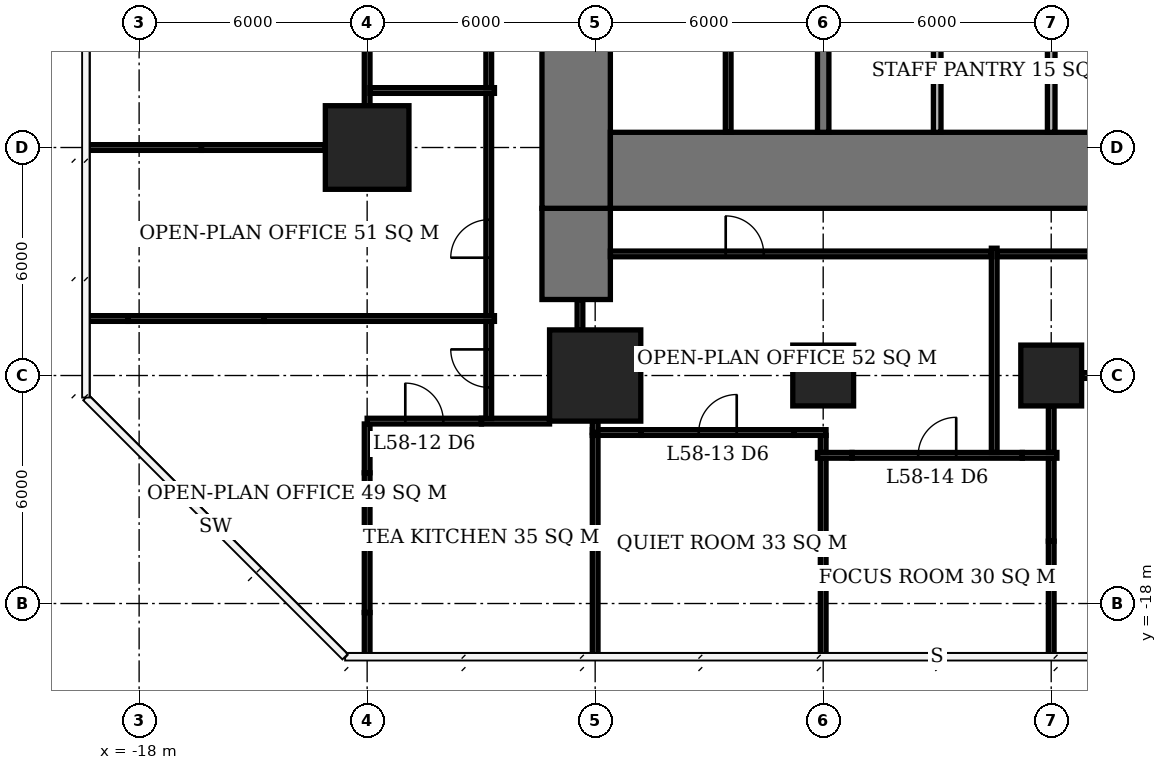
"""IFC4 building model, lengths in metres.
Left out: names, types, materials, properties, quantities, classifications, styles, units other than length and angle.
Written with IfcOpenShell. Run it as: python <this file> out.ifc"""

import sys

from ifc_helpers import new_model, si_unit, direction, frame, frame_2d, origin, origin_2d, place, context, subcontext, project, spatial, rectangle, extrude, element, fill, save


model = new_model("IFC4")
c1 = context("Model", 3, precision=1e-05, world=origin(), true_north=direction((0.0, 1.0)))
c2 = subcontext(c1, "Body", "Model", "MODEL_VIEW")
j1 = project(units=[si_unit("LENGTHUNIT", "METRE"), si_unit("PLANEANGLEUNIT", "RADIAN")], contexts=[c1])
p1 = place(None, origin())
s1 = spatial("IfcSite", under=j1, at=p1, CompositionType="ELEMENT")
p2 = place(p1, origin())
s2 = spatial("IfcBuilding", under=s1, at=p2, CompositionType="ELEMENT")
p3 = place(p2, frame((0.0, 0.0, 235.7)))
s3 = spatial("IfcBuildingStorey", under=s2, at=p3, CompositionType="ELEMENT", Elevation=235.7)
p4 = place(p3, frame((-12.0, -6.0, 0.0), z_axis=(0.0, 0.0, 1.0), x_axis=(1.0, 0.0, 0.0)))
e1 = element("IfcColumn", 1, at=p4, inside=s3, PredefinedType="COLUMN", context=c2, shape_type="SweptSolid", body=[
    extrude(rectangle(XDim=2.2, YDim=2.2, at=origin_2d()), origin(), (0.0, 0.0, 1.0), 3.9),
])
p5 = place(p3, frame((-6.0, -12.0, 0.0), z_axis=(0.0, 0.0, 1.0), x_axis=(1.0, 0.0, 0.0)))
e2 = element("IfcColumn", 2, at=p5, inside=s3, PredefinedType="COLUMN", context=c2, shape_type="SweptSolid", body=[
    extrude(rectangle(XDim=2.4, YDim=2.4, at=origin_2d()), origin(), (0.0, 0.0, 1.0), 3.9),
])
for number, where, z_axis, x_axis in (
    (3, (0.0, -12.0, 0.0), (0.0, 0.0, 1.0), (1.0, 0.0, 0.0)),
    (4, (6.0, -12.0, 0.0), (0.0, 0.0, 1.0), (1.0, 0.0, 0.0)),
):
    element("IfcColumn", number, at=place(p3, frame(where, z_axis=z_axis, x_axis=x_axis)), inside=s3, PredefinedType="COLUMN", context=c2, shape_type="SweptSolid", body=[
        extrude(rectangle(XDim=1.6, YDim=1.6, at=origin_2d()), origin(), (0.0, 0.0, 1.0), 3.9),
    ])
p6 = place(p3, frame((-5.6, -6.6, 0.0), z_axis=(0.0, 0.0, 1.0), x_axis=(1.0, 0.0, 0.0)))
e5 = element("IfcWall", 5, at=p6, inside=s3, PredefinedType="SHEAR", context=c2, shape_type="SweptSolid", body=[
    extrude(rectangle(XDim=23.2, YDim=2.0, at=frame_2d((11.6, 0.0))), origin(), (0.0, 0.0, 1.0), 3.9),
])
p7 = place(p3, frame((-6.5, -7.6, 0.0), z_axis=(0.0, 0.0, 1.0), x_axis=(0.0, 1.0, 0.0)))
e6 = element("IfcWall", 6, at=p7, inside=s3, PredefinedType="SHEAR", context=c2, shape_type="SweptSolid", body=[
    extrude(rectangle(XDim=21.2, YDim=1.8, at=frame_2d((10.6, 0.0))), origin(), (0.0, 0.0, 1.0), 3.9),
])
p8 = place(p7, frame((7.8, 0.0, 0.0)))
e7 = element("IfcOpeningElement", 7, at=p8, cuts=e6, PredefinedType="OPENING", context=c2, shape_type="SweptSolid", body=[
    extrude(rectangle(XDim=1.8, YDim=2.4, at=frame_2d((0.9, 1.2))), frame((0.0, 0.91, 0.0), z_axis=(0.0, -1.0, 0.0), x_axis=(1.0, 0.0, 0.0)), (0.0, 0.0, 1.0), 1.82),
])
p9 = place(p3, frame((-6.5, -10.0, 0.0), z_axis=(0.0, 0.0, 1.0), x_axis=(0.0, 1.0, 0.0)))
e8 = element("IfcWall", 8, at=p9, inside=s3, PredefinedType="SHEAR", context=c2, shape_type="SweptSolid", body=[
    extrude(rectangle(XDim=2.4, YDim=1.8, at=frame_2d((1.2, 0.0))), origin(), (0.0, 0.0, 1.0), 3.9),
])
p10 = place(p3, frame((0.0, -5.6, 0.0), z_axis=(0.0, 0.0, 1.0), x_axis=(0.0, 1.0, 0.0)))
e9 = element("IfcWall", 9, at=p10, inside=s3, PredefinedType="SHEAR", context=c2, shape_type="SweptSolid", body=[
    extrude(rectangle(XDim=5.45, YDim=0.3, at=frame_2d((2.725, 0.0))), origin(), (0.0, 0.0, 1.0), 3.9),
])
for number, where, z_axis, x_axis in (
    (10, (3.0, -5.6, 0.0), (0.0, 0.0, 1.0), (0.0, 1.0, 0.0)),
    (11, (6.0, -5.6, 0.0), (0.0, 0.0, 1.0), (0.0, 1.0, 0.0)),
):
    element("IfcWall", number, at=place(p3, frame(where, z_axis=z_axis, x_axis=x_axis)), inside=s3, PredefinedType="SOLIDWALL", context=c2, shape_type="SweptSolid", body=[
        extrude(rectangle(XDim=5.45, YDim=0.2, at=frame_2d((2.725, 0.0))), origin(), (0.0, 0.0, 1.0), 3.9),
    ])
p11 = place(p3, frame((-2.5, -5.6, 0.0), z_axis=(0.0, 0.0, 1.0), x_axis=(0.0, 1.0, 0.0)))
e12 = element("IfcWall", 12, at=p11, inside=s3, PredefinedType="PLUMBINGWALL", context=c2, shape_type="SweptSolid", body=[
    extrude(rectangle(XDim=5.45, YDim=0.15, at=frame_2d((2.725, 0.0))), origin(), (0.0, 0.0, 1.0), 3.65),
])
p12 = place(p3, frame((-0.15, -14.1, 0.0), z_axis=(0.0, 0.0, 1.0), x_axis=(1.0, 0.0, 0.0)))
e13 = element("IfcWall", 13, at=p12, inside=s3, PredefinedType="PARTITIONING", context=c2, shape_type="SweptSolid", body=[
    extrude(rectangle(XDim=0.91, YDim=0.15, at=frame_2d((0.455, 0.0))), origin(), (0.0, 0.0, 1.0), 2.15),
])
p13 = place(p3, frame((0.76, -14.1, 0.0), z_axis=(0.0, 0.0, 1.0), x_axis=(1.0, 0.0, 0.0)))
e14 = element("IfcWall", 14, at=p13, inside=s3, PredefinedType="PARTITIONING", context=c2, shape_type="SweptSolid", body=[
    extrude(rectangle(XDim=4.48, YDim=0.15, at=frame_2d((2.24, 0.0))), origin(), (0.0, 0.0, 1.0), 3.65),
])
p14 = place(p13, frame((1.74, 0.0, 0.0)))
e15 = element("IfcOpeningElement", 15, at=p14, cuts=e14, PredefinedType="OPENING", context=c2, shape_type="SweptSolid", body=[
    extrude(rectangle(XDim=1.0, YDim=2.1, at=frame_2d((0.5, 1.05))), frame((0.0, 0.085, 0.0), z_axis=(0.0, -1.0, 0.0), x_axis=(1.0, 0.0, 0.0)), (0.0, 0.0, 1.0), 0.17),
])
p15 = place(p3, frame((5.24, -14.1, 0.0), z_axis=(0.0, 0.0, 1.0), x_axis=(1.0, 0.0, 0.0)))
e16 = element("IfcWall", 16, at=p15, inside=s3, PredefinedType="PARTITIONING", context=c2, shape_type="SweptSolid", body=[
    extrude(rectangle(XDim=0.91, YDim=0.15, at=frame_2d((0.455, 0.0))), origin(), (0.0, 0.0, 1.0), 2.15),
])
p16 = place(p3, frame((-6.075, -13.5, 0.0), z_axis=(0.0, 0.0, 1.0), x_axis=(1.0, 0.0, 0.0)))
e17 = element("IfcWall", 17, at=p16, inside=s3, PredefinedType="PARTITIONING", context=c2, shape_type="SweptSolid", body=[
    extrude(rectangle(XDim=1.285, YDim=0.15, at=frame_2d((0.643, 0.0))), origin(), (0.0, 0.0, 1.0), 2.15),
])
p17 = place(p3, frame((-4.79, -13.5, 0.0), z_axis=(0.0, 0.0, 1.0), x_axis=(1.0, 0.0, 0.0)))
e18 = element("IfcWall", 18, at=p17, inside=s3, PredefinedType="PARTITIONING", context=c2, shape_type="SweptSolid", body=[
    extrude(rectangle(XDim=4.03, YDim=0.15, at=frame_2d((2.015, 0.0))), origin(), (0.0, 0.0, 1.0), 3.65),
])
p18 = place(p17, frame((1.515, 0.0, 0.0)))
e19 = element("IfcOpeningElement", 19, at=p18, cuts=e18, PredefinedType="OPENING", context=c2, shape_type="SweptSolid", body=[
    extrude(rectangle(XDim=1.0, YDim=2.1, at=frame_2d((0.5, 1.05))), frame((0.0, 0.085, 0.0), z_axis=(0.0, -1.0, 0.0), x_axis=(1.0, 0.0, 0.0)), (0.0, 0.0, 1.0), 0.17),
])
p19 = place(p3, frame((-0.76, -13.5, 0.0), z_axis=(0.0, 0.0, 1.0), x_axis=(1.0, 0.0, 0.0)))
e20 = element("IfcWall", 20, at=p19, inside=s3, PredefinedType="PARTITIONING", context=c2, shape_type="SweptSolid", body=[
    extrude(rectangle(XDim=0.835, YDim=0.15, at=frame_2d((0.417, 0.0))), origin(), (0.0, 0.0, 1.0), 2.15),
])
p20 = place(p3, frame((-12.0, -13.2, 0.0), z_axis=(0.0, 0.0, 1.0), x_axis=(1.0, 0.0, 0.0)))
e21 = element("IfcWall", 21, at=p20, inside=s3, PredefinedType="PARTITIONING", context=c2, shape_type="SweptSolid", body=[
    extrude(rectangle(XDim=3.008, YDim=0.15, at=frame_2d((1.504, 0.0))), origin(), (0.0, 0.0, 1.0), 3.65),
])
p21 = place(p20, frame((1.004, 0.0, 0.0)))
e22 = element("IfcOpeningElement", 22, at=p21, cuts=e21, PredefinedType="OPENING", context=c2, shape_type="SweptSolid", body=[
    extrude(rectangle(XDim=1.0, YDim=2.1, at=frame_2d((0.5, 1.05))), frame((0.0, 0.085, 0.0), z_axis=(0.0, -1.0, 0.0), x_axis=(1.0, 0.0, 0.0)), (0.0, 0.0, 1.0), 0.17),
])
p22 = place(p3, frame((-8.992, -13.2, 0.0), z_axis=(0.0, 0.0, 1.0), x_axis=(1.0, 0.0, 0.0)))
e23 = element("IfcWall", 23, at=p22, inside=s3, PredefinedType="PARTITIONING", context=c2, shape_type="SweptSolid", body=[
    extrude(rectangle(XDim=1.792, YDim=0.15, at=frame_2d((0.896, 0.0))), origin(), (0.0, 0.0, 1.0), 2.15),
])
p23 = place(p3, frame((6.8, -12.0, 0.0), z_axis=(0.0, 0.0, 1.0), x_axis=(1.0, 0.0, 0.0)))
e24 = element("IfcWall", 24, at=p23, inside=s3, PredefinedType="PARTITIONING", context=c2, shape_type="SweptSolid", body=[
    extrude(rectangle(XDim=4.4, YDim=0.15, at=frame_2d((2.2, 0.0))), origin(), (0.0, 0.0, 1.0), 3.65),
])
p24 = place(p23, frame((1.7, 0.0, 0.0)))
e25 = element("IfcOpeningElement", 25, at=p24, cuts=e24, PredefinedType="OPENING", context=c2, shape_type="SweptSolid", body=[
    extrude(rectangle(XDim=1.0, YDim=2.1, at=frame_2d((0.5, 1.05))), frame((0.0, 0.085, 0.0), z_axis=(0.0, -1.0, 0.0), x_axis=(1.0, 0.0, 0.0)), (0.0, 0.0, 1.0), 0.17),
])
p25 = place(p3, frame((-19.4, -6.0, 0.0), z_axis=(0.0, 0.0, 1.0), x_axis=(1.0, 0.0, 0.0)))
e26 = element("IfcWall", 26, at=p25, inside=s3, PredefinedType="PARTITIONING", context=c2, shape_type="SweptSolid", body=[
    extrude(rectangle(XDim=3.04, YDim=0.15, at=frame_2d((1.52, 0.0))), origin(), (0.0, 0.0, 1.0), 3.65),
])
p26 = place(p3, frame((-16.36, -6.0, 0.0), z_axis=(0.0, 0.0, 1.0), x_axis=(1.0, 0.0, 0.0)))
e27 = element("IfcWall", 27, at=p26, inside=s3, PredefinedType="PARTITIONING", context=c2, shape_type="SweptSolid", body=[
    extrude(rectangle(XDim=3.26, YDim=0.15, at=frame_2d((1.63, 0.0))), origin(), (0.0, 0.0, 1.0), 2.15),
])
p27 = place(p3, frame((-12.0, -19.4, 0.0), z_axis=(0.0, 0.0, 1.0), x_axis=(0.0, 1.0, 0.0)))
e28 = element("IfcWall", 28, at=p27, inside=s3, PredefinedType="PARTITIONING", context=c2, shape_type="SweptSolid", body=[
    extrude(rectangle(XDim=1.163, YDim=0.15, at=frame_2d((0.582, 0.0))), origin(), (0.0, 0.0, 1.0), 3.65),
])
p28 = place(p3, frame((-12.0, -18.237, 0.0), z_axis=(0.0, 0.0, 1.0), x_axis=(0.0, 1.0, 0.0)))
e29 = element("IfcWall", 29, at=p28, inside=s3, PredefinedType="PARTITIONING", context=c2, shape_type="SweptSolid", body=[
    extrude(rectangle(XDim=2.029, YDim=0.15, at=frame_2d((1.015, 0.0))), origin(), (0.0, 0.0, 1.0), 2.15),
])
p29 = place(p3, frame((-12.0, -16.208, 0.0), z_axis=(0.0, 0.0, 1.0), x_axis=(0.0, 1.0, 0.0)))
e30 = element("IfcWall", 30, at=p29, inside=s3, PredefinedType="PARTITIONING", context=c2, shape_type="SweptSolid", body=[
    extrude(rectangle(XDim=1.647, YDim=0.15, at=frame_2d((0.824, 0.0))), origin(), (0.0, 0.0, 1.0), 3.65),
])
p30 = place(p3, frame((-12.0, -14.561, 0.0), z_axis=(0.0, 0.0, 1.0), x_axis=(0.0, 1.0, 0.0)))
e31 = element("IfcWall", 31, at=p30, inside=s3, PredefinedType="PARTITIONING", context=c2, shape_type="SweptSolid", body=[
    extrude(rectangle(XDim=1.286, YDim=0.15, at=frame_2d((0.643, 0.0))), origin(), (0.0, 0.0, 1.0), 2.15),
])
p31 = place(p3, frame((-12.0, -4.915, 0.0), z_axis=(0.0, 0.0, 1.0), x_axis=(0.0, 1.0, 0.0)))
e32 = element("IfcWall", 32, at=p31, inside=s3, PredefinedType="PARTITIONING", context=c2, shape_type="SweptSolid", body=[
    extrude(rectangle(XDim=4.115, YDim=0.15, at=frame_2d((2.058, 0.0))), origin(), (0.0, 0.0, 1.0), 3.65),
])
p32 = place(p3, frame((-6.0, -19.4, 0.0), z_axis=(0.0, 0.0, 1.0), x_axis=(0.0, 1.0, 0.0)))
e33 = element("IfcWall", 33, at=p32, inside=s3, PredefinedType="PARTITIONING", context=c2, shape_type="SweptSolid", body=[
    extrude(rectangle(XDim=3.04, YDim=0.15, at=frame_2d((1.52, 0.0))), origin(), (0.0, 0.0, 1.0), 3.65),
])
p33 = place(p3, frame((-6.0, -16.36, 0.0), z_axis=(0.0, 0.0, 1.0), x_axis=(0.0, 1.0, 0.0)))
e34 = element("IfcWall", 34, at=p33, inside=s3, PredefinedType="PARTITIONING", context=c2, shape_type="SweptSolid", body=[
    extrude(rectangle(XDim=2.785, YDim=0.15, at=frame_2d((1.393, 0.0))), origin(), (0.0, 0.0, 1.0), 2.15),
])
p34 = place(p3, frame((-6.0, -13.5, 0.0), z_axis=(0.0, 0.0, 1.0), x_axis=(0.0, 1.0, 0.0)))
e35 = element("IfcWall", 35, at=p34, inside=s3, PredefinedType="PARTITIONING", context=c2, shape_type="SweptSolid", body=[
    extrude(rectangle(XDim=0.3, YDim=0.15, at=frame_2d((0.15, 0.0))), origin(), (0.0, 0.0, 1.0), 2.15),
])
p35 = place(p3, frame((0.0, -19.35, 0.0), z_axis=(0.0, 0.0, 1.0), x_axis=(0.0, 1.0, 0.0)))
e36 = element("IfcWall", 36, at=p35, inside=s3, PredefinedType="PARTITIONING", context=c2, shape_type="SweptSolid", body=[
    extrude(rectangle(XDim=2.99, YDim=0.15, at=frame_2d((1.495, 0.0))), origin(), (0.0, 0.0, 1.0), 3.65),
])
p36 = place(p3, frame((0.0, -16.36, 0.0), z_axis=(0.0, 0.0, 1.0), x_axis=(0.0, 1.0, 0.0)))
e37 = element("IfcWall", 37, at=p36, inside=s3, PredefinedType="PARTITIONING", context=c2, shape_type="SweptSolid", body=[
    extrude(rectangle(XDim=2.185, YDim=0.15, at=frame_2d((1.093, 0.0))), origin(), (0.0, 0.0, 1.0), 2.15),
])
p37 = place(p3, frame((0.0, -14.025, 0.0), z_axis=(0.0, 0.0, 1.0), x_axis=(0.0, 1.0, 0.0)))
e38 = element("IfcWall", 38, at=p37, inside=s3, PredefinedType="PARTITIONING", context=c2, shape_type="SweptSolid", body=[
    extrude(rectangle(XDim=0.45, YDim=0.15, at=frame_2d((0.225, 0.0))), origin(), (0.0, 0.0, 1.0), 2.15),
])
p38 = place(p3, frame((6.0, -19.35, 0.0), z_axis=(0.0, 0.0, 1.0), x_axis=(0.0, 1.0, 0.0)))
e39 = element("IfcWall", 39, at=p38, inside=s3, PredefinedType="PARTITIONING", context=c2, shape_type="SweptSolid", body=[
    extrude(rectangle(XDim=2.99, YDim=0.15, at=frame_2d((1.495, 0.0))), origin(), (0.0, 0.0, 1.0), 3.65),
])
p39 = place(p3, frame((6.0, -16.36, 0.0), z_axis=(0.0, 0.0, 1.0), x_axis=(0.0, 1.0, 0.0)))
e40 = element("IfcWall", 40, at=p39, inside=s3, PredefinedType="PARTITIONING", context=c2, shape_type="SweptSolid", body=[
    extrude(rectangle(XDim=2.185, YDim=0.15, at=frame_2d((1.093, 0.0))), origin(), (0.0, 0.0, 1.0), 2.15),
])
p40 = place(p3, frame((6.0, -14.025, 0.0), z_axis=(0.0, 0.0, 1.0), x_axis=(0.0, 1.0, 0.0)))
e41 = element("IfcWall", 41, at=p40, inside=s3, PredefinedType="PARTITIONING", context=c2, shape_type="SweptSolid", body=[
    extrude(rectangle(XDim=1.225, YDim=0.15, at=frame_2d((0.612, 0.0))), origin(), (0.0, 0.0, 1.0), 2.15),
])
p41 = place(p3, frame((-19.4, -10.5, 0.0), z_axis=(0.0, 0.0, 1.0), x_axis=(1.0, 0.0, 0.0)))
e42 = element("IfcWall", 42, at=p41, inside=s3, PredefinedType="PARTITIONING", context=c2, shape_type="SweptSolid", body=[
    extrude(rectangle(XDim=1.108, YDim=0.15, at=frame_2d((0.554, 0.0))), origin(), (0.0, 0.0, 1.0), 3.65),
])
p42 = place(p3, frame((-18.292, -10.5, 0.0), z_axis=(0.0, 0.0, 1.0), x_axis=(1.0, 0.0, 0.0)))
e43 = element("IfcWall", 43, at=p42, inside=s3, PredefinedType="PARTITIONING", context=c2, shape_type="SweptSolid", body=[
    extrude(rectangle(XDim=3.584, YDim=0.15, at=frame_2d((1.792, 0.0))), origin(), (0.0, 0.0, 1.0), 2.15),
])
p43 = place(p3, frame((-14.708, -10.5, 0.0), z_axis=(0.0, 0.0, 1.0), x_axis=(1.0, 0.0, 0.0)))
e44 = element("IfcWall", 44, at=p43, inside=s3, PredefinedType="PARTITIONING", context=c2, shape_type="SweptSolid", body=[
    extrude(rectangle(XDim=6.058, YDim=0.15, at=frame_2d((3.029, 0.0))), origin(), (0.0, 0.0, 1.0), 3.65),
])
p44 = place(p3, frame((-11.925, -4.5, 0.0), z_axis=(0.0, 0.0, 1.0), x_axis=(1.0, 0.0, 0.0)))
e45 = element("IfcWall", 45, at=p44, inside=s3, PredefinedType="PARTITIONING", context=c2, shape_type="SweptSolid", body=[
    extrude(rectangle(XDim=3.275, YDim=0.15, at=frame_2d((1.638, 0.0))), origin(), (0.0, 0.0, 1.0), 3.65),
])
p45 = place(p3, frame((-8.8, -13.133, 0.0), z_axis=(0.0, 0.0, 1.0), x_axis=(0.0, 1.0, 0.0)))
e46 = element("IfcWall", 46, at=p45, inside=s3, PredefinedType="PARTITIONING", context=c2, shape_type="SweptSolid", body=[
    extrude(rectangle(XDim=2.558, YDim=0.15, at=frame_2d((1.279, 0.0))), origin(), (0.0, 0.0, 1.0), 3.65),
])
p46 = place(p45, frame((0.82, 0.0, 0.0)))
e47 = element("IfcOpeningElement", 47, at=p46, cuts=e46, PredefinedType="OPENING", context=c2, shape_type="SweptSolid", body=[
    extrude(rectangle(XDim=1.0, YDim=2.1, at=frame_2d((0.5, 1.05))), frame((0.0, 0.085, 0.0), z_axis=(0.0, -1.0, 0.0), x_axis=(1.0, 0.0, 0.0)), (0.0, 0.0, 1.0), 0.17),
])
p47 = place(p3, frame((-8.8, -10.425, 0.0), z_axis=(0.0, 0.0, 1.0), x_axis=(0.0, 1.0, 0.0)))
e48 = element("IfcWall", 48, at=p47, inside=s3, PredefinedType="PARTITIONING", context=c2, shape_type="SweptSolid", body=[
    extrude(rectangle(XDim=5.85, YDim=0.15, at=frame_2d((2.925, 0.0))), origin(), (0.0, 0.0, 1.0), 3.65),
])
p48 = place(p47, frame((1.525, 0.0, 0.0)))
e49 = element("IfcOpeningElement", 49, at=p48, cuts=e48, PredefinedType="OPENING", context=c2, shape_type="SweptSolid", body=[
    extrude(rectangle(XDim=1.0, YDim=2.1, at=frame_2d((0.5, 1.05))), frame((0.0, 0.085, 0.0), z_axis=(0.0, -1.0, 0.0), x_axis=(1.0, 0.0, 0.0)), (0.0, 0.0, 1.0), 0.17),
])
p49 = place(p3, frame((-8.8, -4.425, 0.0), z_axis=(0.0, 0.0, 1.0), x_axis=(0.0, 1.0, 0.0)))
e50 = element("IfcWall", 50, at=p49, inside=s3, PredefinedType="PARTITIONING", context=c2, shape_type="SweptSolid", body=[
    extrude(rectangle(XDim=29.825, YDim=0.15, at=frame_2d((14.913, 0.0))), origin(), (0.0, 0.0, 1.0), 3.65),
])
p50 = place(p49, frame((9.855, 0.0, 0.0)))
e51 = element("IfcOpeningElement", 51, at=p50, cuts=e50, PredefinedType="OPENING", context=c2, shape_type="SweptSolid", body=[
    extrude(rectangle(XDim=1.0, YDim=2.1, at=frame_2d((0.5, 1.05))), frame((0.0, 0.085, 0.0), z_axis=(0.0, -1.0, 0.0), x_axis=(1.0, 0.0, 0.0)), (0.0, 0.0, 1.0), 0.17),
])
p51 = place(p3, frame((-6.4, -10.8, 0.0), z_axis=(0.0, 0.0, 1.0), x_axis=(0.0, 1.0, 0.0)))
e52 = element("IfcWall", 52, at=p51, inside=s3, PredefinedType="PARTITIONING", context=c2, shape_type="SweptSolid", body=[
    extrude(rectangle(XDim=0.8, YDim=0.15, at=frame_2d((0.4, 0.0))), origin(), (0.0, 0.0, 1.0), 3.65),
])
p52 = place(p3, frame((-5.6, -8.8, 0.0), z_axis=(0.0, 0.0, 1.0), x_axis=(1.0, 0.0, 0.0)))
e53 = element("IfcWall", 53, at=p52, inside=s3, PredefinedType="PARTITIONING", context=c2, shape_type="SweptSolid", body=[
    extrude(rectangle(XDim=10.025, YDim=0.15, at=frame_2d((5.013, 0.0))), origin(), (0.0, 0.0, 1.0), 3.65),
])
p53 = place(p52, frame((3.035, 0.0, 0.0)))
e54 = element("IfcOpeningElement", 54, at=p53, cuts=e53, PredefinedType="OPENING", context=c2, shape_type="SweptSolid", body=[
    extrude(rectangle(XDim=1.0, YDim=2.1, at=frame_2d((0.5, 1.05))), frame((0.0, 0.085, 0.0), z_axis=(0.0, -1.0, 0.0), x_axis=(1.0, 0.0, 0.0)), (0.0, 0.0, 1.0), 0.17),
])
p54 = place(p3, frame((4.5, -14.025, 0.0), z_axis=(0.0, 0.0, 1.0), x_axis=(0.0, 1.0, 0.0)))
e55 = element("IfcWall", 55, at=p54, inside=s3, PredefinedType="PARTITIONING", context=c2, shape_type="SweptSolid", body=[
    extrude(rectangle(XDim=5.375, YDim=0.15, at=frame_2d((2.688, 0.0))), origin(), (0.0, 0.0, 1.0), 3.65),
])
p55 = place(p3, frame((4.575, -8.8, 0.0), z_axis=(0.0, 0.0, 1.0), x_axis=(1.0, 0.0, 0.0)))
e56 = element("IfcWall", 56, at=p55, inside=s3, PredefinedType="PARTITIONING", context=c2, shape_type="SweptSolid", body=[
    extrude(rectangle(XDim=13.025, YDim=0.15, at=frame_2d((6.513, 0.0))), origin(), (0.0, 0.0, 1.0), 3.65),
])
p56 = place(p55, frame((4.01, 0.0, 0.0)))
e57 = element("IfcOpeningElement", 57, at=p56, cuts=e56, PredefinedType="OPENING", context=c2, shape_type="SweptSolid", body=[
    extrude(rectangle(XDim=1.0, YDim=2.1, at=frame_2d((0.5, 1.05))), frame((0.0, 0.085, 0.0), z_axis=(0.0, -1.0, 0.0), x_axis=(1.0, 0.0, 0.0)), (0.0, 0.0, 1.0), 0.17),
])
p57 = place(p21, origin())
e58 = element("IfcDoor", 58, at=p57, inside=s3, OperationType="SINGLE_SWING_LEFT", PredefinedType="DOOR", context=c2, shape_type="SweptSolid", body=[
    extrude(rectangle(XDim=1.0, YDim=2.1, at=frame_2d((0.5, 1.05))), frame((0.0, 0.025, 0.0), z_axis=(0.0, -1.0, 0.0), x_axis=(1.0, 0.0, 0.0)), (0.0, 0.0, 1.0), 0.05),
])
fill(e22, e58)
p58 = place(p18, origin())
e59 = element("IfcDoor", 59, at=p58, inside=s3, OperationType="SINGLE_SWING_RIGHT", PredefinedType="DOOR", context=c2, shape_type="SweptSolid", body=[
    extrude(rectangle(XDim=1.0, YDim=2.1, at=frame_2d((0.5, 1.05))), frame((0.0, 0.025, 0.0), z_axis=(0.0, -1.0, 0.0), x_axis=(1.0, 0.0, 0.0)), (0.0, 0.0, 1.0), 0.05),
])
fill(e19, e59)
p59 = place(p14, origin())
e60 = element("IfcDoor", 60, at=p59, inside=s3, OperationType="SINGLE_SWING_RIGHT", PredefinedType="DOOR", context=c2, shape_type="SweptSolid", body=[
    extrude(rectangle(XDim=1.0, YDim=2.1, at=frame_2d((0.5, 1.05))), frame((0.0, 0.025, 0.0), z_axis=(0.0, -1.0, 0.0), x_axis=(1.0, 0.0, 0.0)), (0.0, 0.0, 1.0), 0.05),
])
fill(e15, e60)
p60 = place(p46, origin())
e61 = element("IfcDoor", 61, at=p60, inside=s3, OperationType="SINGLE_SWING_RIGHT", PredefinedType="DOOR", context=c2, shape_type="SweptSolid", body=[
    extrude(rectangle(XDim=1.0, YDim=2.1, at=frame_2d((0.5, 1.05))), frame((0.0, 0.025, 0.0), z_axis=(0.0, -1.0, 0.0), x_axis=(1.0, 0.0, 0.0)), (0.0, 0.0, 1.0), 0.05),
])
fill(e47, e61)
p61 = place(p53, origin())
e62 = element("IfcDoor", 62, at=p61, inside=s3, OperationType="SINGLE_SWING_LEFT", PredefinedType="DOOR", context=c2, shape_type="SweptSolid", body=[
    extrude(rectangle(XDim=1.0, YDim=2.1, at=frame_2d((0.5, 1.05))), frame((0.0, 0.025, 0.0), z_axis=(0.0, -1.0, 0.0), x_axis=(1.0, 0.0, 0.0)), (0.0, 0.0, 1.0), 0.05),
])
fill(e54, e62)
p62 = place(p48, origin())
e63 = element("IfcDoor", 63, at=p62, inside=s3, OperationType="SINGLE_SWING_LEFT", PredefinedType="DOOR", context=c2, shape_type="SweptSolid", body=[
    extrude(rectangle(XDim=1.0, YDim=2.1, at=frame_2d((0.5, 1.05))), frame((0.0, 0.025, 0.0), z_axis=(0.0, -1.0, 0.0), x_axis=(1.0, 0.0, 0.0)), (0.0, 0.0, 1.0), 0.05),
])
fill(e49, e63)
save(model, sys.argv[1])
